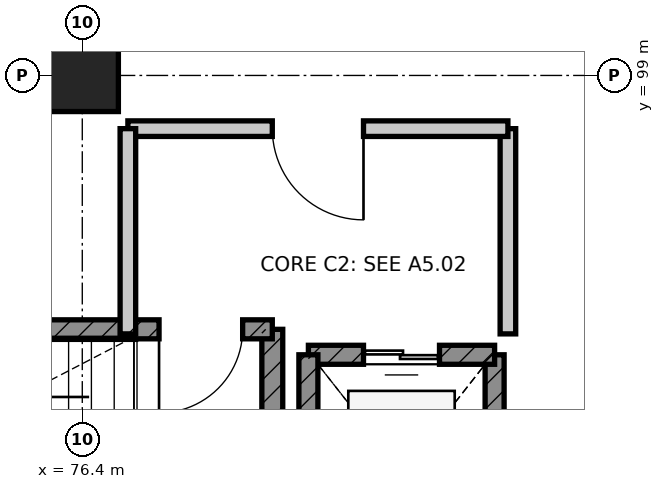
"""IFC4 building model, lengths in metres.
Left out: names, types, materials, properties, quantities, classifications, styles, units other than length and angle.
Written with IfcOpenShell. Run it as: python <this file> out.ifc"""

import sys

from ifc_helpers import new_model, si_unit, direction, frame, frame_2d, origin, origin_2d, place, context, subcontext, project, spatial, rectangle, extrude, element, fill, save


model = new_model("IFC4")
c1 = context("Model", 3, precision=1e-05, world=origin(), true_north=direction((0.0, 1.0)))
c2 = subcontext(c1, "Body", "Model", "MODEL_VIEW")
j1 = project(units=[si_unit("LENGTHUNIT", "METRE"), si_unit("PLANEANGLEUNIT", "RADIAN")], contexts=[c1])
p1 = place(None, origin())
s1 = spatial("IfcSite", under=j1, at=p1, CompositionType="ELEMENT")
p2 = place(p1, origin())
s2 = spatial("IfcBuilding", under=s1, at=p2, CompositionType="ELEMENT")
p3 = place(p2, frame((0.0, 0.0, 5.4)))
s3 = spatial("IfcBuildingStorey", under=s2, at=p3, CompositionType="ELEMENT", Elevation=5.4)
p4 = place(p3, frame((76.4, 99.0, 0.0), z_axis=(0.0, 0.0, 1.0), x_axis=(1.0, 0.0, 0.0)))
e1 = element("IfcColumn", 1, at=p4, inside=s3, PredefinedType="COLUMN", context=c2, shape_type="SweptSolid", body=[
    extrude(rectangle(XDim=0.95, YDim=0.95, at=origin_2d()), origin(), (0.0, 0.0, 1.0), 5.1),
])
p5 = place(p3, frame((78.9, 92.1, 0.0), z_axis=(0.0, 0.0, 1.0), x_axis=(0.0, 1.0, 0.0)))
e2 = element("IfcWall", 2, at=p5, inside=s3, PredefinedType="SHEAR", context=c2, shape_type="SweptSolid", body=[
    extrude(rectangle(XDim=3.56, YDim=0.275, at=frame_2d((1.78, 0.0))), origin(), (0.0, 0.0, 1.0), 4.78),
])
p6 = place(p3, frame((78.9, 95.66, 0.0), z_axis=(0.0, 0.0, 1.0), x_axis=(-1.0, 0.0, 0.0)))
e3 = element("IfcWall", 3, at=p6, inside=s3, PredefinedType="SHEAR", context=c2, shape_type="SweptSolid", body=[
    extrude(rectangle(XDim=8.4, YDim=0.25, at=frame_2d((4.2, 0.0))), origin(), (0.0, 0.0, 1.0), 4.78),
])
p7 = place(p6, frame((0.39, 0.0, 0.0)))
e4 = element("IfcOpeningElement", 4, at=p7, cuts=e3, PredefinedType="OPENING", context=c2, shape_type="SweptSolid", body=[
    extrude(rectangle(XDim=1.1, YDim=2.1, at=frame_2d((0.55, 1.05))), frame((0.0, 0.135, 0.0), z_axis=(0.0, -1.0, 0.0), x_axis=(1.0, 0.0, 0.0)), (0.0, 0.0, 1.0), 0.27),
])
p8 = place(p3, frame((81.825, 92.275, 0.0), z_axis=(0.0, 0.0, 1.0), x_axis=(0.0, 1.0, 0.0)))
e5 = element("IfcWall", 5, at=p8, inside=s3, PredefinedType="SHEAR", context=c2, shape_type="SweptSolid", body=[
    extrude(rectangle(XDim=3.05, YDim=0.25, at=frame_2d((1.525, 0.0))), origin(), (0.0, 0.0, 1.0), 4.78),
])
p9 = place(p3, frame((81.825, 95.325, 0.0), z_axis=(0.0, 0.0, 1.0), x_axis=(-1.0, 0.0, 0.0)))
e6 = element("IfcWall", 6, at=p9, inside=s3, PredefinedType="SHEAR", context=c2, shape_type="SweptSolid", body=[
    extrude(rectangle(XDim=2.45, YDim=0.25, at=frame_2d((1.225, 0.0))), origin(), (0.0, 0.0, 1.0), 4.78),
])
p10 = place(p9, frame((0.725, 0.0, 0.0)))
e7 = element("IfcOpeningElement", 7, at=p10, cuts=e6, PredefinedType="OPENING", context=c2, shape_type="SweptSolid", body=[
    extrude(rectangle(XDim=1.0, YDim=2.15, at=frame_2d((0.5, 1.075))), frame((0.0, 0.135, 0.0), z_axis=(0.0, -1.0, 0.0), x_axis=(1.0, 0.0, 0.0)), (0.0, 0.0, 1.0), 0.27),
])
p11 = place(p3, frame((79.375, 95.325, 0.0), z_axis=(0.0, 0.0, 1.0), x_axis=(0.0, -1.0, 0.0)))
e8 = element("IfcWall", 8, at=p11, inside=s3, PredefinedType="SHEAR", context=c2, shape_type="SweptSolid", body=[
    extrude(rectangle(XDim=3.05, YDim=0.25, at=frame_2d((1.525, 0.0))), origin(), (0.0, 0.0, 1.0), 4.78),
])
p12 = place(p3, frame((82.0, 95.6, 0.0), z_axis=(0.0, 0.0, 1.0), x_axis=(0.0, 1.0, 0.0)))
e9 = element("IfcWall", 9, at=p12, inside=s3, PredefinedType="PARTITIONING", context=c2, shape_type="SweptSolid", body=[
    extrude(rectangle(XDim=2.7, YDim=0.205, at=frame_2d((1.35, 0.0))), origin(), (0.0, 0.0, 1.0), 4.78),
])
p13 = place(p3, frame((82.0, 98.3, 0.0), z_axis=(0.0, 0.0, 1.0), x_axis=(-1.0, 0.0, 0.0)))
e10 = element("IfcWall", 10, at=p13, inside=s3, PredefinedType="PARTITIONING", context=c2, shape_type="SweptSolid", body=[
    extrude(rectangle(XDim=5.0, YDim=0.205, at=frame_2d((2.5, 0.0))), origin(), (0.0, 0.0, 1.0), 3.445),
])
p14 = place(p13, frame((1.9, 0.0, 0.0)))
e11 = element("IfcOpeningElement", 11, at=p14, cuts=e10, PredefinedType="OPENING", context=c2, shape_type="SweptSolid", body=[
    extrude(rectangle(XDim=1.2, YDim=2.1, at=frame_2d((0.6, 1.05))), frame((0.0, 0.113, 0.0), z_axis=(0.0, -1.0, 0.0), x_axis=(1.0, 0.0, 0.0)), (0.0, 0.0, 1.0), 0.225),
])
p15 = place(p3, frame((77.0, 98.3, 0.0), z_axis=(0.0, 0.0, 1.0), x_axis=(0.0, -1.0, 0.0)))
e12 = element("IfcWall", 12, at=p15, inside=s3, PredefinedType="PARTITIONING", context=c2, shape_type="SweptSolid", body=[
    extrude(rectangle(XDim=2.7, YDim=0.205, at=frame_2d((1.35, 0.0))), origin(), (0.0, 0.0, 1.0), 4.78),
])
p16 = place(p7, origin())
e13 = element("IfcDoor", 13, at=p16, inside=s3, OperationType="SINGLE_SWING_RIGHT", PredefinedType="DOOR", context=c2, shape_type="SweptSolid", body=[
    extrude(rectangle(XDim=1.1, YDim=2.1, at=frame_2d((0.55, 1.05))), frame((0.0, 0.025, 0.0), z_axis=(0.0, -1.0, 0.0), x_axis=(1.0, 0.0, 0.0)), (0.0, 0.0, 1.0), 0.05),
])
fill(e4, e13)
p17 = place(p10, origin())
e14 = element("IfcDoor", 14, at=p17, inside=s3, OperationType="DOUBLE_DOOR_SLIDING", PredefinedType="DOOR", context=c2, shape_type="SweptSolid", body=[
    extrude(rectangle(XDim=1.0, YDim=2.15, at=frame_2d((0.5, 1.075))), frame((0.0, 0.025, 0.0), z_axis=(0.0, -1.0, 0.0), x_axis=(1.0, 0.0, 0.0)), (0.0, 0.0, 1.0), 0.05),
])
fill(e7, e14)
p18 = place(p14, origin())
e15 = element("IfcDoor", 15, at=p18, inside=s3, OperationType="SINGLE_SWING_LEFT", PredefinedType="DOOR", context=c2, shape_type="SweptSolid", body=[
    extrude(rectangle(XDim=1.2, YDim=2.1, at=frame_2d((0.6, 1.05))), frame((0.0, 0.025, 0.0), z_axis=(0.0, -1.0, 0.0), x_axis=(1.0, 0.0, 0.0)), (0.0, 0.0, 1.0), 0.05),
])
fill(e11, e15)
save(model, sys.argv[1])
